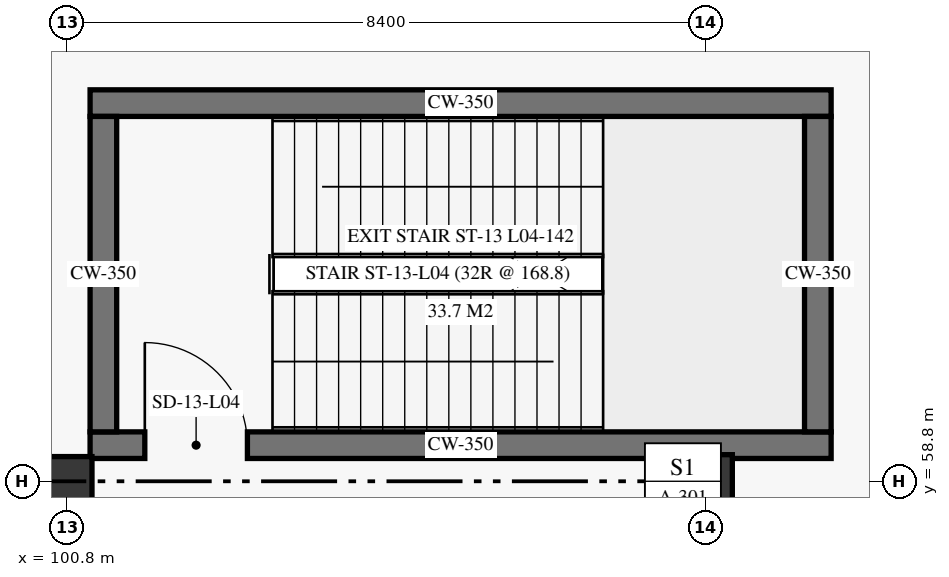
"""IFC4 building model, lengths in metres.
Left out: names, types, materials, properties, quantities, classifications, styles, units other than length and angle.
Written with IfcOpenShell. Run it as: python <this file> out.ifc"""

import sys

from ifc_helpers import new_model, si_unit, direction, frame, frame_2d, origin, origin_2d, place, context, subcontext, project, spatial, rectangle, extrude, element, fill, save


model = new_model("IFC4")
c1 = context("Model", 3, precision=1e-05, world=origin(), true_north=direction((0.0, 1.0)))
c2 = subcontext(c1, "Body", "Model", "MODEL_VIEW")
j1 = project(units=[si_unit("LENGTHUNIT", "METRE"), si_unit("PLANEANGLEUNIT", "RADIAN")], contexts=[c1])
p1 = place(None, origin())
s1 = spatial("IfcSite", under=j1, at=p1, CompositionType="ELEMENT")
p2 = place(p1, origin())
s2 = spatial("IfcBuilding", under=s1, at=p2, CompositionType="ELEMENT")
p3 = place(p2, frame((0.0, 0.0, 16.8)))
s3 = spatial("IfcBuildingStorey", under=s2, at=p3, CompositionType="ELEMENT", Elevation=16.8)
p4 = place(p3, frame((100.8, 58.8, 0.0), z_axis=(0.0, 0.0, 1.0), x_axis=(1.0, 0.0, 0.0)))
e1 = element("IfcColumn", 1, at=p4, inside=s3, PredefinedType="COLUMN", context=c2, shape_type="SweptSolid", body=[
    extrude(rectangle(XDim=0.65, YDim=0.65, at=origin_2d()), origin(), (0.0, 0.0, 1.0), 5.1),
])
p5 = place(p3, frame((109.2, 58.8, 0.0), z_axis=(0.0, 0.0, 1.0), x_axis=(1.0, 0.0, 0.0)))
e2 = element("IfcColumn", 2, at=p5, inside=s3, PredefinedType="COLUMN", context=c2, shape_type="SweptSolid", body=[
    extrude(rectangle(XDim=0.7, YDim=0.7, at=origin_2d()), origin(), (0.0, 0.0, 1.0), 5.1),
])
p6 = place(p3, frame((101.1, 59.275, 0.0), z_axis=(0.0, 0.0, 1.0), x_axis=(1.0, 0.0, 0.0)))
e3 = element("IfcWall", 3, at=p6, inside=s3, PredefinedType="SHEAR", context=c2, shape_type="SweptSolid", body=[
    extrude(rectangle(XDim=9.75, YDim=0.35, at=frame_2d((4.875, 0.0))), origin(), (0.0, 0.0, 1.0), 5.1),
])
p7 = place(p6, frame((0.72, 0.0, 0.0)))
e4 = element("IfcOpeningElement", 4, at=p7, cuts=e3, PredefinedType="OPENING", context=c2, shape_type="SweptSolid", body=[
    extrude(rectangle(XDim=1.35, YDim=2.25, at=frame_2d((0.675, 1.125))), frame((0.0, 0.185, 0.0), z_axis=(0.0, -1.0, 0.0), x_axis=(1.0, 0.0, 0.0)), (0.0, 0.0, 1.0), 0.37),
])
p8 = place(p3, frame((101.1, 63.775, 0.0), z_axis=(0.0, 0.0, 1.0), x_axis=(1.0, 0.0, 0.0)))
e5 = element("IfcWall", 5, at=p8, inside=s3, PredefinedType="SHEAR", context=c2, shape_type="SweptSolid", body=[
    extrude(rectangle(XDim=9.75, YDim=0.35, at=frame_2d((4.875, 0.0))), origin(), (0.0, 0.0, 1.0), 5.1),
])
for number, where, z_axis, x_axis in (
    (6, (101.275, 59.45, 0.0), (0.0, 0.0, 1.0), (0.0, 1.0, 0.0)),
    (7, (110.675, 59.45, 0.0), (0.0, 0.0, 1.0), (0.0, 1.0, 0.0)),
):
    element("IfcWall", number, at=place(p3, frame(where, z_axis=z_axis, x_axis=x_axis)), inside=s3, PredefinedType="SHEAR", context=c2, shape_type="SweptSolid", body=[
        extrude(rectangle(XDim=4.15, YDim=0.35, at=frame_2d((2.075, 0.0))), origin(), (0.0, 0.0, 1.0), 5.1),
    ])
p9 = place(p7, origin())
e8 = element("IfcDoor", 8, at=p9, inside=s3, OperationType="SINGLE_SWING_LEFT", PredefinedType="DOOR", context=c2, shape_type="SweptSolid", body=[
    extrude(rectangle(XDim=1.35, YDim=2.25, at=frame_2d((0.675, 1.125))), frame((0.0, 0.025, 0.0), z_axis=(0.0, -1.0, 0.0), x_axis=(1.0, 0.0, 0.0)), (0.0, 0.0, 1.0), 0.05),
])
fill(e4, e8)
save(model, sys.argv[1])
